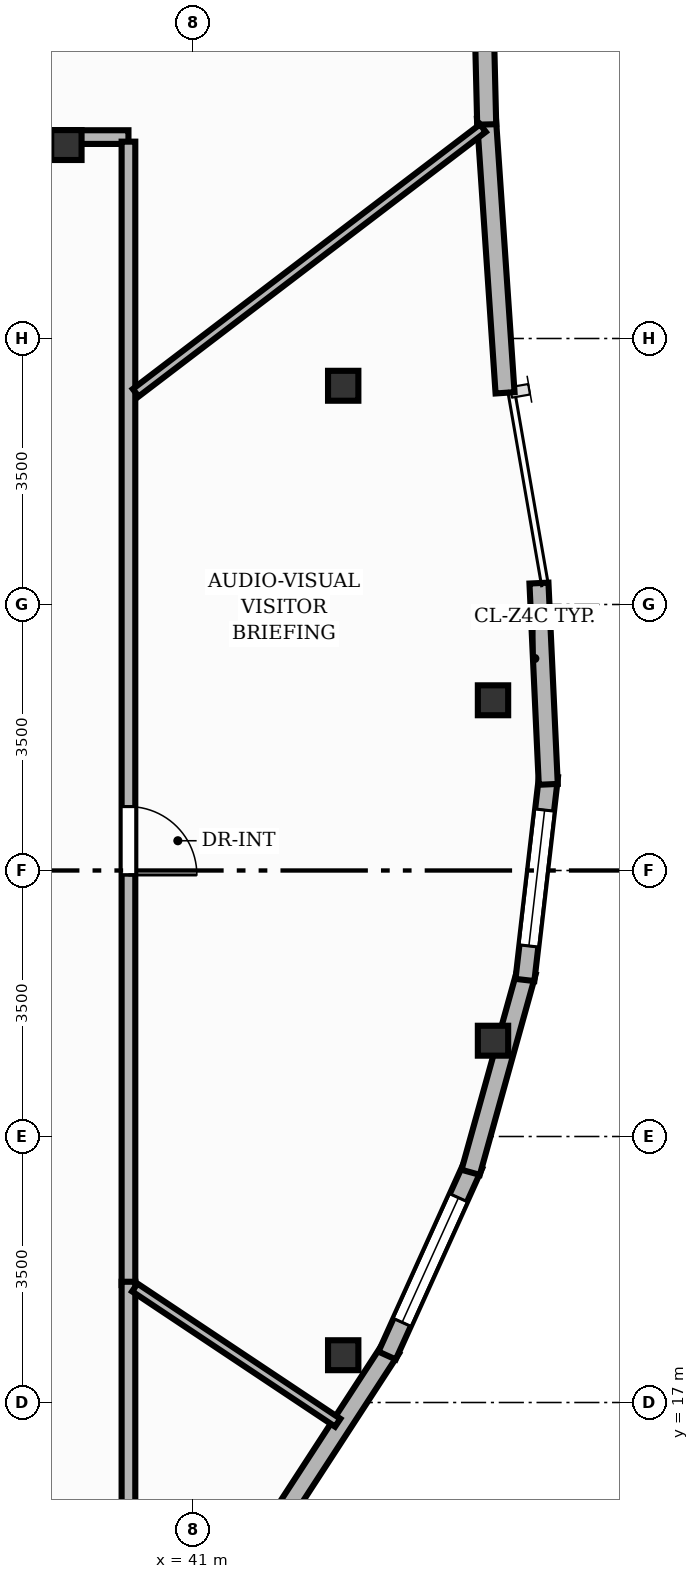
"""IFC4 building model, lengths in metres.
Left out: names, types, materials, properties, quantities, classifications, styles, units other than length and angle.
Written with IfcOpenShell. Run it as: python <this file> out.ifc"""

import sys

from ifc_helpers import new_model, si_unit, direction, frame, frame_2d, origin, origin_2d, place, context, subcontext, project, spatial, rectangle, i_section, extrude, element, fill, save


model = new_model("IFC4")
c1 = context("Model", 3, precision=1e-05, world=origin(), true_north=direction((0.0, 1.0)))
c2 = subcontext(c1, "Body", "Model", "MODEL_VIEW")
j1 = project(units=[si_unit("LENGTHUNIT", "METRE"), si_unit("PLANEANGLEUNIT", "RADIAN")], contexts=[c1])
p1 = place(None, origin())
s1 = spatial("IfcSite", under=j1, at=p1, CompositionType="ELEMENT")
p2 = place(p1, origin())
s2 = spatial("IfcBuilding", under=s1, at=p2, CompositionType="ELEMENT")
p3 = place(p2, frame((0.0, 0.0, 243.04)))
s3 = spatial("IfcBuildingStorey", under=s2, at=p3, CompositionType="ELEMENT", Elevation=243.04)
for number, where, z_axis, x_axis in (
    (1, (44.946, 26.24, 0.0), (0.0, 0.0, 1.0), (1.0, 0.0, 0.0)),
    (2, (42.975, 30.378, 0.0), (0.0, 0.0, 1.0), (1.0, 0.0, 0.0)),
    (3, (39.333, 33.545, 0.0), (0.0, 0.0, 1.0), (1.0, 0.0, 0.0)),
    (4, (42.975, 17.622, 0.0), (0.0, 0.0, 1.0), (1.0, 0.0, 0.0)),
    (5, (44.946, 21.76, 0.0), (0.0, 0.0, 1.0), (1.0, 0.0, 0.0)),
):
    element("IfcColumn", number, at=place(p3, frame(where, z_axis=z_axis, x_axis=x_axis)), inside=s3, PredefinedType="COLUMN", context=c2, shape_type="SweptSolid", body=[
        extrude(i_section(OverallWidth=0.399, OverallDepth=0.394, WebThickness=0.023, FlangeThickness=0.037, at=origin_2d()), origin(), (0.0, 0.0, 1.0), 3.84),
    ])
p4 = place(p3, frame((43.605, 17.713, 0.0), z_axis=(0.0, 0.0, 1.0), x_axis=(-0.545041246002, -0.838409231913, 0.0)))
e6 = element("IfcWall", 6, at=p4, inside=s3, PredefinedType="SOLIDWALL", context=c2, shape_type="SweptSolid", body=[
    extrude(rectangle(XDim=2.758, YDim=0.25, at=frame_2d((1.379, 0.0))), origin(), (0.0, 0.0, 1.0), 3.52),
])
p5 = place(p3, frame((44.69, 20.131, 0.0), z_axis=(0.0, 0.0, 1.0), x_axis=(-0.411961415151, -0.911201290839, 0.0)))
e7 = element("IfcWall", 7, at=p5, inside=s3, PredefinedType="SOLIDWALL", context=c2, shape_type="SweptSolid", body=[
    extrude(rectangle(XDim=2.758, YDim=0.25, at=frame_2d((1.379, 0.0))), origin(), (0.0, 0.0, 1.0), 3.52),
])
p6 = place(p5, frame((0.479, 0.0, 0.85)))
e8 = element("IfcOpeningElement", 8, at=p6, cuts=e7, PredefinedType="OPENING", context=c2, shape_type="SweptSolid", body=[
    extrude(rectangle(XDim=1.8, YDim=2.0, at=frame_2d((0.9, 1.0))), frame((0.0, 0.135, 0.0), z_axis=(0.0, -1.0, 0.0), x_axis=(1.0, 0.0, 0.0)), (0.0, 0.0, 1.0), 0.27),
])
p7 = place(p3, frame((45.387, 22.667, 0.0), z_axis=(0.0, 0.0, 1.0), x_axis=(-0.268356519564, -0.963319665743, 0.0)))
e9 = element("IfcWall", 9, at=p7, inside=s3, PredefinedType="SOLIDWALL", context=c2, shape_type="SweptSolid", body=[
    extrude(rectangle(XDim=2.738, YDim=0.25, at=frame_2d((1.369, 0.0))), origin(), (0.0, 0.0, 1.0), 3.137),
])
p8 = place(p3, frame((45.677, 25.243, 0.0), z_axis=(0.0, 0.0, 1.0), x_axis=(-0.115121415392, -0.993351428105, 0.0)))
e10 = element("IfcWall", 10, at=p8, inside=s3, PredefinedType="SOLIDWALL", context=c2, shape_type="SweptSolid", body=[
    extrude(rectangle(XDim=2.702, YDim=0.25, at=frame_2d((1.351, 0.0))), origin(), (0.0, 0.0, 1.0), 3.137),
])
p9 = place(p8, frame((0.451, 0.0, 0.85)))
e11 = element("IfcOpeningElement", 11, at=p9, cuts=e10, PredefinedType="OPENING", context=c2, shape_type="SweptSolid", body=[
    extrude(rectangle(XDim=1.8, YDim=2.0, at=frame_2d((0.9, 1.0))), frame((0.0, 0.135, 0.0), z_axis=(0.0, -1.0, 0.0), x_axis=(1.0, 0.0, 0.0)), (0.0, 0.0, 1.0), 0.27),
])
p10 = place(p3, frame((45.551, 27.781, 0.0), z_axis=(0.0, 0.0, 1.0), x_axis=(0.046326751692, -0.998926339666, 0.0)))
e12 = element("IfcWall", 12, at=p10, inside=s3, PredefinedType="SOLIDWALL", context=c2, shape_type="SweptSolid", body=[
    extrude(rectangle(XDim=2.651, YDim=0.25, at=frame_2d((1.325, 0.0))), origin(), (0.0, 0.0, 1.0), 3.52),
])
p11 = place(p3, frame((44.86, 33.901, 0.0), z_axis=(0.0, 0.0, 1.0), x_axis=(0.067708398877, -0.9977051532, 0.0)))
e13 = element("IfcWall", 13, at=p11, inside=s3, PredefinedType="SOLIDWALL", context=c2, shape_type="SweptSolid", body=[
    extrude(rectangle(XDim=3.624, YDim=0.25, at=frame_2d((1.812, 0.0))), origin(), (0.0, 0.0, 1.0), 3.52),
])
p12 = place(p3, frame((44.759, 38.104, 0.0), z_axis=(0.0, 0.0, 1.0), x_axis=(0.024363566468, -0.999703164259, 0.0)))
e14 = element("IfcWall", 14, at=p12, inside=s3, PredefinedType="SOLIDWALL", context=c2, shape_type="SweptSolid", body=[
    extrude(rectangle(XDim=4.289, YDim=0.25, at=frame_2d((2.145, 0.0))), origin(), (0.0, 0.0, 1.0), 3.52),
])
p13 = place(p12, frame((1.245, 0.0, 0.85)))
e15 = element("IfcOpeningElement", 15, at=p13, cuts=e14, PredefinedType="OPENING", context=c2, shape_type="SweptSolid", body=[
    extrude(rectangle(XDim=1.8, YDim=2.0, at=frame_2d((0.9, 1.0))), frame((0.0, 0.135, 0.0), z_axis=(0.0, -1.0, 0.0), x_axis=(1.0, 0.0, 0.0)), (0.0, 0.0, 1.0), 0.27),
])
p14 = place(p3, frame((23.85, 33.65, 0.0), z_axis=(0.0, 0.0, 1.0), x_axis=(1.0, 0.0, 0.0)))
e16 = element("IfcWall", 16, at=p14, inside=s3, PredefinedType="PARTITIONING", context=c2, shape_type="SweptSolid", body=[
    extrude(rectangle(XDim=16.3, YDim=0.18, at=frame_2d((8.15, 0.0))), origin(), (0.0, 0.0, 1.0), 2.878),
])
p15 = place(p14, frame((12.16, 0.0, 0.0)))
e17 = element("IfcOpeningElement", 17, at=p15, cuts=e16, PredefinedType="OPENING", context=c2, shape_type="SweptSolid", body=[
    extrude(rectangle(XDim=0.9, YDim=2.1, at=frame_2d((0.45, 1.05))), frame((0.0, 0.1, 0.0), z_axis=(0.0, -1.0, 0.0), x_axis=(1.0, 0.0, 0.0)), (0.0, 0.0, 1.0), 0.2),
])
p16 = place(p14, frame((4.03, 0.0, 0.0)))
e18 = element("IfcOpeningElement", 18, at=p16, cuts=e16, PredefinedType="OPENING", context=c2, shape_type="SweptSolid", body=[
    extrude(rectangle(XDim=0.9, YDim=2.1, at=frame_2d((0.45, 1.05))), frame((0.0, 0.1, 0.0), z_axis=(0.0, -1.0, 0.0), x_axis=(1.0, 0.0, 0.0)), (0.0, 0.0, 1.0), 0.2),
])
p17 = place(p3, frame((40.15, 33.59, 0.0), z_axis=(0.0, 0.0, 1.0), x_axis=(0.0, -1.0, 0.0)))
e19 = element("IfcWall", 19, at=p17, inside=s3, PredefinedType="PARTITIONING", context=c2, shape_type="SweptSolid", body=[
    extrude(rectangle(XDim=15.045, YDim=0.18, at=frame_2d((7.523, 0.0))), origin(), (0.0, 0.0, 1.0), 3.515),
])
p18 = place(p17, frame((8.749, 0.0, 0.0)))
e20 = element("IfcOpeningElement", 20, at=p18, cuts=e19, PredefinedType="OPENING", context=c2, shape_type="SweptSolid", body=[
    extrude(rectangle(XDim=0.9, YDim=2.1, at=frame_2d((0.45, 1.05))), frame((0.0, 0.1, 0.0), z_axis=(0.0, -1.0, 0.0), x_axis=(1.0, 0.0, 0.0)), (0.0, 0.0, 1.0), 0.2),
])
p19 = place(p3, frame((40.15, 18.589, 0.0), z_axis=(0.0, 0.0, 1.0), x_axis=(0.0, -1.0, 0.0)))
e21 = element("IfcWall", 21, at=p19, inside=s3, PredefinedType="PARTITIONING", context=c2, shape_type="SweptSolid", body=[
    extrude(rectangle(XDim=4.179, YDim=0.18, at=frame_2d((2.089, 0.0))), origin(), (0.0, 0.0, 1.0), 3.515),
])
p20 = place(p3, frame((44.813, 33.768, 0.0), z_axis=(0.0, 0.0, 1.0), x_axis=(-0.795267778137, -0.606258328649, 0.0)))
e22 = element("IfcWall", 22, at=p20, inside=s3, PredefinedType="PARTITIONING", context=c2, shape_type="SweptSolid", body=[
    extrude(rectangle(XDim=5.744, YDim=0.125, at=frame_2d((2.872, 0.0))), origin(), (0.0, 0.0, 1.0), 3.515),
])
p21 = place(p3, frame((40.233, 18.513, 0.0), z_axis=(0.0, 0.0, 1.0), x_axis=(0.832167333271, -0.554524597685, 0.0)))
e23 = element("IfcWall", 23, at=p21, inside=s3, PredefinedType="PARTITIONING", context=c2, shape_type="SweptSolid", body=[
    extrude(rectangle(XDim=3.209, YDim=0.125, at=frame_2d((1.604, 0.0))), origin(), (0.0, 0.0, 1.0), 3.515),
])
p22 = place(p6, origin())
e24 = element("IfcWindow", 24, at=p22, inside=s3, PartitioningType="SINGLE_PANEL", PredefinedType="WINDOW", context=c2, shape_type="SweptSolid", body=[
    extrude(rectangle(XDim=1.8, YDim=2.0, at=frame_2d((0.9, 1.0))), frame((0.0, 0.03, 0.0), z_axis=(0.0, -1.0, 0.0), x_axis=(1.0, 0.0, 0.0)), (0.0, 0.0, 1.0), 0.06),
])
fill(e8, e24)
p23 = place(p9, origin())
e25 = element("IfcWindow", 25, at=p23, inside=s3, PartitioningType="SINGLE_PANEL", PredefinedType="WINDOW", context=c2, shape_type="SweptSolid", body=[
    extrude(rectangle(XDim=1.8, YDim=2.0, at=frame_2d((0.9, 1.0))), frame((0.0, 0.03, 0.0), z_axis=(0.0, -1.0, 0.0), x_axis=(1.0, 0.0, 0.0)), (0.0, 0.0, 1.0), 0.06),
])
fill(e11, e25)
p24 = place(p18, origin())
e26 = element("IfcDoor", 26, at=p24, inside=s3, OperationType="SINGLE_SWING_RIGHT", PredefinedType="DOOR", context=c2, shape_type="SweptSolid", body=[
    extrude(rectangle(XDim=0.9, YDim=2.1, at=frame_2d((0.45, 1.05))), frame((0.0, 0.025, 0.0), z_axis=(0.0, -1.0, 0.0), x_axis=(1.0, 0.0, 0.0)), (0.0, 0.0, 1.0), 0.05),
])
fill(e20, e26)
save(model, sys.argv[1])
